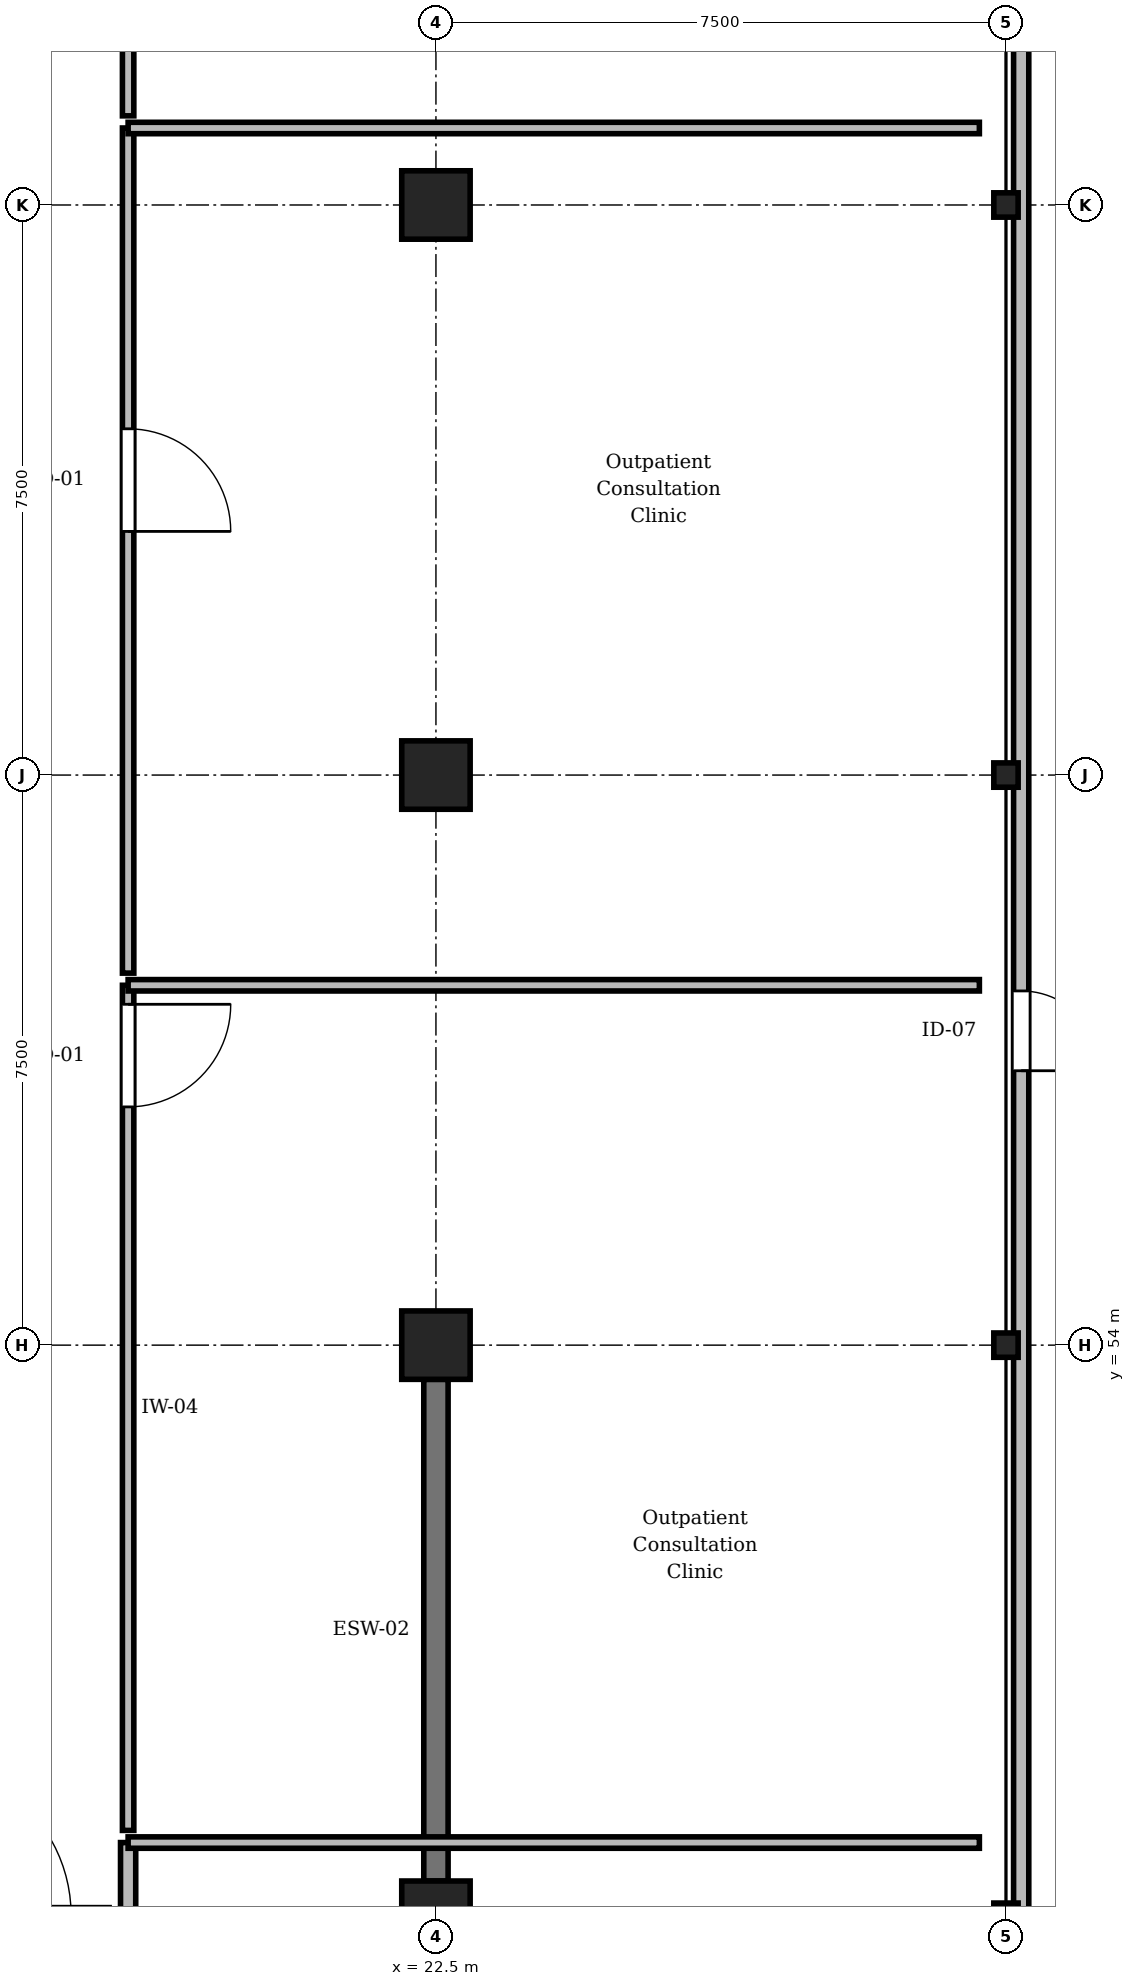
"""IFC4 building model, lengths in metres.
Left out: names, types, materials, properties, quantities, classifications, styles, units other than length and angle.
Written with IfcOpenShell. Run it as: python <this file> out.ifc"""

import sys

from ifc_helpers import new_model, si_unit, direction, frame, frame_2d, origin, origin_2d, place, context, subcontext, project, spatial, rectangle, circle, extrude, element, fill, save


model = new_model("IFC4")
c1 = context("Model", 3, precision=1e-05, world=origin(), true_north=direction((0.0, 1.0)))
c2 = subcontext(c1, "Body", "Model", "MODEL_VIEW")
j1 = project(units=[si_unit("LENGTHUNIT", "METRE"), si_unit("PLANEANGLEUNIT", "RADIAN")], contexts=[c1])
p1 = place(None, origin())
s1 = spatial("IfcSite", under=j1, at=p1, CompositionType="ELEMENT")
p2 = place(p1, origin())
s2 = spatial("IfcBuilding", under=s1, at=p2, CompositionType="ELEMENT")
p3 = place(p2, origin())
s3 = spatial("IfcBuildingStorey", under=s2, at=p3, CompositionType="ELEMENT", Elevation=0.0)
p4 = place(p3, frame((22.5, 46.5, 0.0), z_axis=(0.0, 0.0, 1.0), x_axis=(1.0, 0.0, 0.0)))
e1 = element("IfcColumn", 1, at=p4, inside=s3, PredefinedType="COLUMN", context=c2, shape_type="SweptSolid", body=[
    extrude(circle(Radius=0.45, at=origin_2d()), origin(), (0.0, 0.0, 1.0), 4.8),
])
for number, where, z_axis, x_axis in (
    (2, (22.5, 54.0, 0.0), (0.0, 0.0, 1.0), (1.0, 0.0, 0.0)),
    (3, (22.5, 61.5, 0.0), (0.0, 0.0, 1.0), (1.0, 0.0, 0.0)),
):
    element("IfcColumn", number, at=place(p3, frame(where, z_axis=z_axis, x_axis=x_axis)), inside=s3, PredefinedType="COLUMN", context=c2, shape_type="SweptSolid", body=[
        extrude(rectangle(XDim=0.9, YDim=0.9, at=origin_2d()), origin(), (0.0, 0.0, 1.0), 4.8),
    ])
p5 = place(p3, frame((22.5, 69.0, 0.0), z_axis=(0.0, 0.0, 1.0), x_axis=(1.0, 0.0, 0.0)))
e4 = element("IfcColumn", 4, at=p5, inside=s3, PredefinedType="COLUMN", context=c2, shape_type="SweptSolid", body=[
    extrude(circle(Radius=0.45, at=origin_2d()), origin(), (0.0, 0.0, 1.0), 4.8),
])
for number, where, z_axis, x_axis in (
    (5, (30.0, 46.5, 0.0), (0.0, 0.0, 1.0), (1.0, 0.0, 0.0)),
    (6, (30.0, 54.0, 0.0), (0.0, 0.0, 1.0), (1.0, 0.0, 0.0)),
    (7, (30.0, 61.5, 0.0), (0.0, 0.0, 1.0), (1.0, 0.0, 0.0)),
    (8, (30.0, 69.0, 0.0), (0.0, 0.0, 1.0), (1.0, 0.0, 0.0)),
):
    element("IfcColumn", number, at=place(p3, frame(where, z_axis=z_axis, x_axis=x_axis)), inside=s3, PredefinedType="COLUMN", context=c2, shape_type="SweptSolid", body=[
        extrude(rectangle(XDim=0.32, YDim=0.32, at=origin_2d()), origin(), (0.0, 0.0, 1.0), 4.8),
    ])
p6 = place(p3, frame((22.5, 46.95, 0.0), z_axis=(0.0, 0.0, 1.0), x_axis=(0.0, 1.0, 0.0)))
e9 = element("IfcWall", 9, at=p6, inside=s3, PredefinedType="SHEAR", context=c2, shape_type="SweptSolid", body=[
    extrude(rectangle(XDim=6.6, YDim=0.32, at=frame_2d((3.3, 0.0))), origin(), (0.0, 0.0, 1.0), 3.95),
])
p7 = place(p3, frame((18.45, 47.456, 0.0), z_axis=(0.0, 0.0, 1.0), x_axis=(0.0, -1.0, 0.0)))
e10 = element("IfcWall", 10, at=p7, inside=s3, PredefinedType="STANDARD", context=c2, shape_type="SweptSolid", body=[
    extrude(rectangle(XDim=11.119, YDim=0.2, at=frame_2d((5.559, 0.0))), origin(), (0.0, 0.0, 1.0), 4.485),
])
p8 = place(p7, frame((4.077, 0.0, 0.0)))
e11 = element("IfcOpeningElement", 11, at=p8, cuts=e10, PredefinedType="OPENING", context=c2, shape_type="SweptSolid", body=[
    extrude(rectangle(XDim=1.05, YDim=2.2, at=frame_2d((0.525, 1.1))), frame((0.0, 0.11, 0.0), z_axis=(0.0, -1.0, 0.0), x_axis=(1.0, 0.0, 0.0)), (0.0, 0.0, 1.0), 0.22),
])
p9 = place(p3, frame((18.45, 58.734, 0.0), z_axis=(0.0, 0.0, 1.0), x_axis=(0.0, -1.0, 0.0)))
e12 = element("IfcWall", 12, at=p9, inside=s3, PredefinedType="PARTITIONING", context=c2, shape_type="SweptSolid", body=[
    extrude(rectangle(XDim=11.119, YDim=0.15, at=frame_2d((5.559, 0.0))), origin(), (0.0, 0.0, 1.0), 4.485),
])
p10 = place(p9, frame((0.25, 0.0, 0.0)))
e13 = element("IfcOpeningElement", 13, at=p10, cuts=e12, PredefinedType="OPENING", context=c2, shape_type="SweptSolid", body=[
    extrude(rectangle(XDim=1.35, YDim=2.25, at=frame_2d((0.675, 1.125))), frame((0.0, 0.085, 0.0), z_axis=(0.0, -1.0, 0.0), x_axis=(1.0, 0.0, 0.0)), (0.0, 0.0, 1.0), 0.17),
])
p11 = place(p3, frame((18.45, 70.013, 0.0), z_axis=(0.0, 0.0, 1.0), x_axis=(0.0, -1.0, 0.0)))
e14 = element("IfcWall", 14, at=p11, inside=s3, PredefinedType="PARTITIONING", context=c2, shape_type="SweptSolid", body=[
    extrude(rectangle(XDim=11.119, YDim=0.15, at=frame_2d((5.559, 0.0))), origin(), (0.0, 0.0, 1.0), 4.485),
])
p12 = place(p11, frame((3.958, 0.0, 0.0)))
e15 = element("IfcOpeningElement", 15, at=p12, cuts=e14, PredefinedType="OPENING", context=c2, shape_type="SweptSolid", body=[
    extrude(rectangle(XDim=1.35, YDim=2.25, at=frame_2d((0.675, 1.125))), frame((0.0, 0.085, 0.0), z_axis=(0.0, -1.0, 0.0), x_axis=(1.0, 0.0, 0.0)), (0.0, 0.0, 1.0), 0.17),
])
p13 = place(p3, frame((18.45, 81.292, 0.0), z_axis=(0.0, 0.0, 1.0), x_axis=(0.0, -1.0, 0.0)))
e16 = element("IfcWall", 16, at=p13, inside=s3, PredefinedType="PARTITIONING", context=c2, shape_type="SweptSolid", body=[
    extrude(rectangle(XDim=11.119, YDim=0.15, at=frame_2d((5.559, 0.0))), origin(), (0.0, 0.0, 1.0), 4.085),
])
p14 = place(p13, frame((0.25, 0.0, 0.0)))
e17 = element("IfcOpeningElement", 17, at=p14, cuts=e16, PredefinedType="OPENING", context=c2, shape_type="SweptSolid", body=[
    extrude(rectangle(XDim=1.35, YDim=2.25, at=frame_2d((0.675, 1.125))), frame((0.0, 0.085, 0.0), z_axis=(0.0, -1.0, 0.0), x_axis=(1.0, 0.0, 0.0)), (0.0, 0.0, 1.0), 0.17),
])
p15 = place(p3, frame((30.2, 76.15, 0.0), z_axis=(0.0, 0.0, 1.0), x_axis=(0.0, -1.0, 0.0)))
e18 = element("IfcWall", 18, at=p15, inside=s3, PredefinedType="STANDARD", context=c2, shape_type="SweptSolid", body=[
    extrude(rectangle(XDim=44.65, YDim=0.2, at=frame_2d((22.325, 0.0))), origin(), (0.0, 0.0, 1.0), 3.935),
])
p16 = place(p15, frame((17.49, 0.0, 0.0)))
e19 = element("IfcOpeningElement", 19, at=p16, cuts=e18, PredefinedType="OPENING", context=c2, shape_type="SweptSolid", body=[
    extrude(rectangle(XDim=1.05, YDim=2.2, at=frame_2d((0.525, 1.1))), frame((0.0, 0.11, 0.0), z_axis=(0.0, -1.0, 0.0), x_axis=(1.0, 0.0, 0.0)), (0.0, 0.0, 1.0), 0.22),
])
for number, where, z_axis, x_axis in (
    (20, (18.45, 47.456, 0.0), (0.0, 0.0, 1.0), (1.0, 0.0, 0.0)),
    (21, (18.45, 58.734, 0.0), (0.0, 0.0, 1.0), (1.0, 0.0, 0.0)),
    (22, (18.45, 70.013, 0.0), (0.0, 0.0, 1.0), (1.0, 0.0, 0.0)),
):
    element("IfcWall", number, at=place(p3, frame(where, z_axis=z_axis, x_axis=x_axis)), inside=s3, PredefinedType="PARTITIONING", context=c2, shape_type="SweptSolid", body=[
        extrude(rectangle(XDim=11.2, YDim=0.15, at=frame_2d((5.6, 0.0))), origin(), (0.0, 0.0, 1.0), 4.485),
    ])
p17 = place(p10, origin())
e23 = element("IfcDoor", 23, at=p17, inside=s3, OperationType="SINGLE_SWING_LEFT", PredefinedType="DOOR", context=c2, shape_type="SweptSolid", body=[
    extrude(rectangle(XDim=1.35, YDim=2.25, at=frame_2d((0.675, 1.125))), frame((0.0, 0.025, 0.0), z_axis=(0.0, -1.0, 0.0), x_axis=(1.0, 0.0, 0.0)), (0.0, 0.0, 1.0), 0.05),
])
fill(e13, e23)
p18 = place(p12, origin())
e24 = element("IfcDoor", 24, at=p18, inside=s3, OperationType="SINGLE_SWING_RIGHT", PredefinedType="DOOR", context=c2, shape_type="SweptSolid", body=[
    extrude(rectangle(XDim=1.35, YDim=2.25, at=frame_2d((0.675, 1.125))), frame((0.0, 0.025, 0.0), z_axis=(0.0, -1.0, 0.0), x_axis=(1.0, 0.0, 0.0)), (0.0, 0.0, 1.0), 0.05),
])
fill(e15, e24)
p19 = place(p16, origin())
e25 = element("IfcDoor", 25, at=p19, inside=s3, OperationType="SINGLE_SWING_RIGHT", PredefinedType="DOOR", context=c2, shape_type="SweptSolid", body=[
    extrude(rectangle(XDim=1.05, YDim=2.2, at=frame_2d((0.525, 1.1))), frame((0.0, 0.025, 0.0), z_axis=(0.0, -1.0, 0.0), x_axis=(1.0, 0.0, 0.0)), (0.0, 0.0, 1.0), 0.05),
])
fill(e19, e25)
save(model, sys.argv[1])
